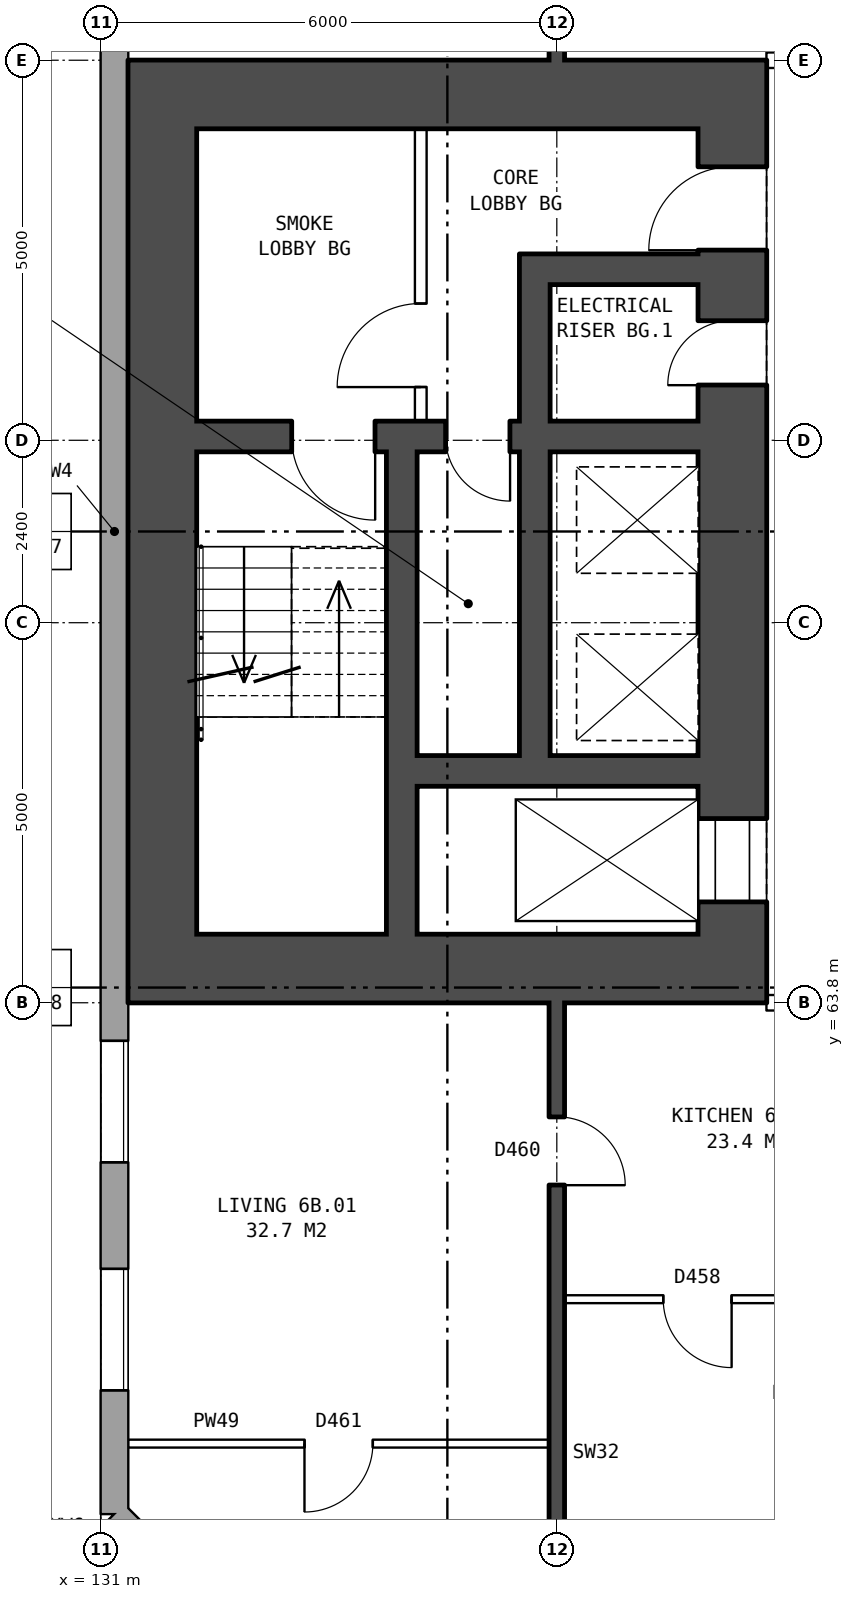
"""IFC4 building model, lengths in metres.
Left out: names, types, materials, properties, quantities, classifications, styles, units other than length and angle.
Written with IfcOpenShell. Run it as: python <this file> out.ifc"""

import sys

from ifc_helpers import new_model, si_unit, direction, frame, frame_2d, origin, place, context, subcontext, project, spatial, rectangle, extrude, element, fill, save


model = new_model("IFC4")
c1 = context("Model", 3, precision=1e-05, world=origin(), true_north=direction((0.0, 1.0)))
c2 = subcontext(c1, "Body", "Model", "MODEL_VIEW")
j1 = project(units=[si_unit("LENGTHUNIT", "METRE"), si_unit("PLANEANGLEUNIT", "RADIAN")], contexts=[c1])
p1 = place(None, origin())
s1 = spatial("IfcSite", under=j1, at=p1, CompositionType="ELEMENT")
p2 = place(p1, origin())
s2 = spatial("IfcBuilding", under=s1, at=p2, CompositionType="ELEMENT")
p3 = place(p2, frame((0.0, 0.0, 25.7)))
s3 = spatial("IfcBuildingStorey", under=s2, at=p3, CompositionType="ELEMENT", Elevation=25.7)
p4 = place(p3, frame((131.18, 57.075, 0.0), z_axis=(0.0, 0.0, 1.0), x_axis=(0.707106781187, -0.707106781187, 0.0)))
e1 = element("IfcWall", 1, at=p4, inside=s3, PredefinedType="STANDARD", context=c2, shape_type="SweptSolid", body=[
    extrude(rectangle(XDim=4.094, YDim=0.36, at=frame_2d((2.047, 0.0))), origin(), (0.0, 0.0, 1.0), 2.85),
])
p5 = place(p4, frame((1.247, 0.0, 0.8)))
e2 = element("IfcOpeningElement", 2, at=p5, cuts=e1, PredefinedType="OPENING", context=c2, shape_type="SweptSolid", body=[
    extrude(rectangle(XDim=1.6, YDim=1.8, at=frame_2d((0.8, 0.9))), frame((0.0, 0.19, 0.0), z_axis=(0.0, -1.0, 0.0), x_axis=(1.0, 0.0, 0.0)), (0.0, 0.0, 1.0), 0.38),
])
p6 = place(p3, frame((131.18, 82.925, 0.0), z_axis=(0.0, 0.0, 1.0), x_axis=(0.0, -1.0, 0.0)))
e3 = element("IfcWall", 3, at=p6, inside=s3, PredefinedType="STANDARD", context=c2, shape_type="SweptSolid", body=[
    extrude(rectangle(XDim=25.851, YDim=0.36, at=frame_2d((12.925, 0.0))), origin(), (0.0, 0.0, 1.0), 2.85),
])
p7 = place(p6, frame((1.625, 0.0, 0.8)))
e4 = element("IfcOpeningElement", 4, at=p7, cuts=e3, PredefinedType="OPENING", context=c2, shape_type="SweptSolid", body=[
    extrude(rectangle(XDim=1.6, YDim=1.8, at=frame_2d((0.8, 0.9))), frame((0.0, 0.19, 0.0), z_axis=(0.0, -1.0, 0.0), x_axis=(1.0, 0.0, 0.0)), (0.0, 0.0, 1.0), 0.38),
])
p8 = place(p6, frame((4.625, 0.0, 0.8)))
e5 = element("IfcOpeningElement", 5, at=p8, cuts=e3, PredefinedType="OPENING", context=c2, shape_type="SweptSolid", body=[
    extrude(rectangle(XDim=1.6, YDim=1.8, at=frame_2d((0.8, 0.9))), frame((0.0, 0.19, 0.0), z_axis=(0.0, -1.0, 0.0), x_axis=(1.0, 0.0, 0.0)), (0.0, 0.0, 1.0), 0.38),
])
p9 = place(p6, frame((19.625, 0.0, 0.8)))
e6 = element("IfcOpeningElement", 6, at=p9, cuts=e3, PredefinedType="OPENING", context=c2, shape_type="SweptSolid", body=[
    extrude(rectangle(XDim=1.6, YDim=1.8, at=frame_2d((0.8, 0.9))), frame((0.0, 0.19, 0.0), z_axis=(0.0, -1.0, 0.0), x_axis=(1.0, 0.0, 0.0)), (0.0, 0.0, 1.0), 0.38),
])
p10 = place(p6, frame((22.625, 0.0, 0.8)))
e7 = element("IfcOpeningElement", 7, at=p10, cuts=e3, PredefinedType="OPENING", context=c2, shape_type="SweptSolid", body=[
    extrude(rectangle(XDim=1.6, YDim=1.8, at=frame_2d((0.8, 0.9))), frame((0.0, 0.19, 0.0), z_axis=(0.0, -1.0, 0.0), x_axis=(1.0, 0.0, 0.0)), (0.0, 0.0, 1.0), 0.38),
])
p11 = place(p3, frame((139.31, 64.7, 0.0), z_axis=(0.0, 0.0, 1.0), x_axis=(0.0, 1.0, 0.0)))
e8 = element("IfcWall", 8, at=p11, inside=s3, PredefinedType="SHEAR", context=c2, shape_type="SweptSolid", body=[
    extrude(rectangle(XDim=10.6, YDim=0.9, at=frame_2d((5.3, 0.0))), origin(), (0.0, 0.0, 1.0), 2.85),
])
p12 = place(p11, frame((0.425, 0.0, 0.0)))
e9 = element("IfcOpeningElement", 9, at=p12, cuts=e8, PredefinedType="OPENING", context=c2, shape_type="SweptSolid", body=[
    extrude(rectangle(XDim=1.1, YDim=2.1, at=frame_2d((0.55, 1.05))), frame((0.0, 0.46, 0.0), z_axis=(0.0, -1.0, 0.0), x_axis=(1.0, 0.0, 0.0)), (0.0, 0.0, 1.0), 0.92),
])
p13 = place(p11, frame((9.0, 0.0, 0.0)))
e10 = element("IfcOpeningElement", 10, at=p13, cuts=e8, PredefinedType="OPENING", context=c2, shape_type="SweptSolid", body=[
    extrude(rectangle(XDim=1.1, YDim=2.1, at=frame_2d((0.55, 1.05))), frame((0.0, 0.46, 0.0), z_axis=(0.0, -1.0, 0.0), x_axis=(1.0, 0.0, 0.0)), (0.0, 0.0, 1.0), 0.92),
])
p14 = place(p11, frame((7.225, 0.0, 0.0)))
e11 = element("IfcOpeningElement", 11, at=p14, cuts=e8, PredefinedType="OPENING", context=c2, shape_type="SweptSolid", body=[
    extrude(rectangle(XDim=0.85, YDim=2.1, at=frame_2d((0.425, 1.05))), frame((0.0, 0.46, 0.0), z_axis=(0.0, -1.0, 0.0), x_axis=(1.0, 0.0, 0.0)), (0.0, 0.0, 1.0), 0.92),
])
p15 = place(p3, frame((131.81, 64.7, 0.0), z_axis=(0.0, 0.0, 1.0), x_axis=(0.0, 1.0, 0.0)))
e12 = element("IfcWall", 12, at=p15, inside=s3, PredefinedType="SHEAR", context=c2, shape_type="SweptSolid", body=[
    extrude(rectangle(XDim=10.6, YDim=0.9, at=frame_2d((5.3, 0.0))), origin(), (0.0, 0.0, 1.0), 2.85),
])
for number, where, z_axis, x_axis in (
    (13, (139.76, 64.25, 0.0), (0.0, 0.0, 1.0), (-1.0, 0.0, 0.0)),
    (14, (139.76, 75.75, 0.0), (0.0, 0.0, 1.0), (-1.0, 0.0, 0.0)),
):
    element("IfcWall", number, at=place(p3, frame(where, z_axis=z_axis, x_axis=x_axis)), inside=s3, PredefinedType="SHEAR", context=c2, shape_type="SweptSolid", body=[
        extrude(rectangle(XDim=8.4, YDim=0.9, at=frame_2d((4.2, 0.0))), origin(), (0.0, 0.0, 1.0), 2.85),
    ])
p16 = place(p3, frame((138.86, 66.85, 0.0), z_axis=(0.0, 0.0, 1.0), x_axis=(-1.0, 0.0, 0.0)))
e15 = element("IfcWall", 15, at=p16, inside=s3, PredefinedType="SHEAR", context=c2, shape_type="SweptSolid", body=[
    extrude(rectangle(XDim=3.7, YDim=0.4, at=frame_2d((1.85, 0.0))), origin(), (0.0, 0.0, 1.0), 2.85),
])
p17 = place(p3, frame((138.86, 71.25, 0.0), z_axis=(0.0, 0.0, 1.0), x_axis=(-1.0, 0.0, 0.0)))
e16 = element("IfcWall", 16, at=p17, inside=s3, PredefinedType="SHEAR", context=c2, shape_type="SweptSolid", body=[
    extrude(rectangle(XDim=6.6, YDim=0.4, at=frame_2d((3.3, 0.0))), origin(), (0.0, 0.0, 1.0), 2.85),
])
p18 = place(p17, frame((4.25, 0.0, 0.0)))
e17 = element("IfcOpeningElement", 17, at=p18, cuts=e16, PredefinedType="OPENING", context=c2, shape_type="SweptSolid", body=[
    extrude(rectangle(XDim=1.1, YDim=2.1, at=frame_2d((0.55, 1.05))), frame((0.0, 0.21, 0.0), z_axis=(0.0, -1.0, 0.0), x_axis=(1.0, 0.0, 0.0)), (0.0, 0.0, 1.0), 0.42),
])
p19 = place(p17, frame((2.475, 0.0, 0.0)))
e18 = element("IfcOpeningElement", 18, at=p19, cuts=e16, PredefinedType="OPENING", context=c2, shape_type="SweptSolid", body=[
    extrude(rectangle(XDim=0.85, YDim=2.1, at=frame_2d((0.425, 1.05))), frame((0.0, 0.21, 0.0), z_axis=(0.0, -1.0, 0.0), x_axis=(1.0, 0.0, 0.0)), (0.0, 0.0, 1.0), 0.42),
])
p20 = place(p3, frame((138.86, 73.45, 0.0), z_axis=(0.0, 0.0, 1.0), x_axis=(-1.0, 0.0, 0.0)))
e19 = element("IfcWall", 19, at=p20, inside=s3, PredefinedType="SHEAR", context=c2, shape_type="SweptSolid", body=[
    extrude(rectangle(XDim=1.95, YDim=0.4, at=frame_2d((0.975, 0.0))), origin(), (0.0, 0.0, 1.0), 2.85),
])
p21 = place(p3, frame((136.71, 67.05, 0.0), z_axis=(0.0, 0.0, 1.0), x_axis=(0.0, 1.0, 0.0)))
e20 = element("IfcWall", 20, at=p21, inside=s3, PredefinedType="SHEAR", context=c2, shape_type="SweptSolid", body=[
    extrude(rectangle(XDim=4.0, YDim=0.4, at=frame_2d((2.0, 0.0))), origin(), (0.0, 0.0, 1.0), 2.85),
])
p22 = place(p3, frame((136.71, 71.45, 0.0), z_axis=(0.0, 0.0, 1.0), x_axis=(0.0, 1.0, 0.0)))
e21 = element("IfcWall", 21, at=p22, inside=s3, PredefinedType="SHEAR", context=c2, shape_type="SweptSolid", body=[
    extrude(rectangle(XDim=2.2, YDim=0.4, at=frame_2d((1.1, 0.0))), origin(), (0.0, 0.0, 1.0), 2.85),
])
p23 = place(p3, frame((135.21, 71.45, 0.0), z_axis=(0.0, 0.0, 1.0), x_axis=(0.0, 1.0, 0.0)))
e22 = element("IfcWall", 22, at=p23, inside=s3, PredefinedType="PARTITIONING", context=c2, shape_type="SweptSolid", body=[
    extrude(rectangle(XDim=3.85, YDim=0.15, at=frame_2d((1.925, 0.0))), origin(), (0.0, 0.0, 1.0), 2.85),
])
p24 = place(p23, frame((0.45, 0.0, 0.0)))
e23 = element("IfcOpeningElement", 23, at=p24, cuts=e22, PredefinedType="OPENING", context=c2, shape_type="SweptSolid", body=[
    extrude(rectangle(XDim=1.1, YDim=2.1, at=frame_2d((0.55, 1.05))), frame((0.0, 0.085, 0.0), z_axis=(0.0, -1.0, 0.0), x_axis=(1.0, 0.0, 0.0)), (0.0, 0.0, 1.0), 0.17),
])
p25 = place(p3, frame((134.96, 64.7, 0.0), z_axis=(0.0, 0.0, 1.0), x_axis=(0.0, 1.0, 0.0)))
e24 = element("IfcWall", 24, at=p25, inside=s3, PredefinedType="SHEAR", context=c2, shape_type="SweptSolid", body=[
    extrude(rectangle(XDim=6.35, YDim=0.4, at=frame_2d((3.175, 0.0))), origin(), (0.0, 0.0, 1.0), 2.85),
])
p26 = place(p3, frame((131.36, 58.0, 0.0), z_axis=(0.0, 0.0, 1.0), x_axis=(1.0, 0.0, 0.0)))
e25 = element("IfcWall", 25, at=p26, inside=s3, PredefinedType="PARTITIONING", context=c2, shape_type="SweptSolid", body=[
    extrude(rectangle(XDim=5.54, YDim=0.1, at=frame_2d((2.77, 0.0))), origin(), (0.0, 0.0, 1.0), 2.85),
])
p27 = place(p26, frame((2.32, 0.0, 0.0)))
e26 = element("IfcOpeningElement", 26, at=p27, cuts=e25, PredefinedType="OPENING", context=c2, shape_type="SweptSolid", body=[
    extrude(rectangle(XDim=0.9, YDim=2.1, at=frame_2d((0.45, 1.05))), frame((0.0, 0.06, 0.0), z_axis=(0.0, -1.0, 0.0), x_axis=(1.0, 0.0, 0.0)), (0.0, 0.0, 1.0), 0.12),
])
p28 = place(p3, frame((137.1, 59.9, 0.0), z_axis=(0.0, 0.0, 1.0), x_axis=(1.0, 0.0, 0.0)))
e27 = element("IfcWall", 27, at=p28, inside=s3, PredefinedType="PARTITIONING", context=c2, shape_type="SweptSolid", body=[
    extrude(rectangle(XDim=5.8, YDim=0.1, at=frame_2d((2.9, 0.0))), origin(), (0.0, 0.0, 1.0), 2.85),
])
p29 = place(p28, frame((1.3, 0.0, 0.0)))
e28 = element("IfcOpeningElement", 28, at=p29, cuts=e27, PredefinedType="OPENING", context=c2, shape_type="SweptSolid", body=[
    extrude(rectangle(XDim=0.9, YDim=2.1, at=frame_2d((0.45, 1.05))), frame((0.0, 0.06, 0.0), z_axis=(0.0, -1.0, 0.0), x_axis=(1.0, 0.0, 0.0)), (0.0, 0.0, 1.0), 0.12),
])
p30 = place(p28, frame((4.2, 0.0, 0.0)))
e29 = element("IfcOpeningElement", 29, at=p30, cuts=e27, PredefinedType="OPENING", context=c2, shape_type="SweptSolid", body=[
    extrude(rectangle(XDim=0.9, YDim=2.1, at=frame_2d((0.45, 1.05))), frame((0.0, 0.06, 0.0), z_axis=(0.0, -1.0, 0.0), x_axis=(1.0, 0.0, 0.0)), (0.0, 0.0, 1.0), 0.12),
])
p31 = place(p3, frame((139.76, 63.8, 0.0), z_axis=(0.0, 0.0, 1.0), x_axis=(1.0, 0.0, 0.0)))
e30 = element("IfcWall", 30, at=p31, inside=s3, PredefinedType="PARTITIONING", context=c2, shape_type="SweptSolid", body=[
    extrude(rectangle(XDim=3.0, YDim=0.2, at=frame_2d((1.5, 0.0))), origin(), (0.0, 0.0, 1.0), 2.85),
])
p32 = place(p31, frame((1.0, 0.0, 0.0)))
e31 = element("IfcOpeningElement", 31, at=p32, cuts=e30, PredefinedType="OPENING", context=c2, shape_type="SweptSolid", body=[
    extrude(rectangle(XDim=1.0, YDim=2.1, at=frame_2d((0.5, 1.05))), frame((0.0, 0.11, 0.0), z_axis=(0.0, -1.0, 0.0), x_axis=(1.0, 0.0, 0.0)), (0.0, 0.0, 1.0), 0.22),
])
p33 = place(p3, frame((139.76, 76.2, 0.0), z_axis=(0.0, 0.0, 1.0), x_axis=(1.0, 0.0, 0.0)))
e32 = element("IfcWall", 32, at=p33, inside=s3, PredefinedType="PARTITIONING", context=c2, shape_type="SweptSolid", body=[
    extrude(rectangle(XDim=3.0, YDim=0.2, at=frame_2d((1.5, 0.0))), origin(), (0.0, 0.0, 1.0), 2.85),
])
p34 = place(p33, frame((1.0, 0.0, 0.0)))
e33 = element("IfcOpeningElement", 33, at=p34, cuts=e32, PredefinedType="OPENING", context=c2, shape_type="SweptSolid", body=[
    extrude(rectangle(XDim=1.0, YDim=2.1, at=frame_2d((0.5, 1.05))), frame((0.0, 0.11, 0.0), z_axis=(0.0, -1.0, 0.0), x_axis=(1.0, 0.0, 0.0)), (0.0, 0.0, 1.0), 0.22),
])
p35 = place(p3, frame((137.0, 54.36, 0.0), z_axis=(0.0, 0.0, 1.0), x_axis=(0.0, 1.0, 0.0)))
e34 = element("IfcWall", 34, at=p35, inside=s3, PredefinedType="SOLIDWALL", context=c2, shape_type="SweptSolid", body=[
    extrude(rectangle(XDim=9.44, YDim=0.2, at=frame_2d((4.72, 0.0))), origin(), (0.0, 0.0, 1.0), 2.85),
])
p36 = place(p35, frame((7.04, 0.0, 0.0)))
e35 = element("IfcOpeningElement", 35, at=p36, cuts=e34, PredefinedType="OPENING", context=c2, shape_type="SweptSolid", body=[
    extrude(rectangle(XDim=0.9, YDim=2.1, at=frame_2d((0.45, 1.05))), frame((0.0, 0.11, 0.0), z_axis=(0.0, -1.0, 0.0), x_axis=(1.0, 0.0, 0.0)), (0.0, 0.0, 1.0), 0.22),
])
p37 = place(p3, frame((137.0, 76.2, 0.0), z_axis=(0.0, 0.0, 1.0), x_axis=(0.0, 1.0, 0.0)))
e36 = element("IfcWall", 36, at=p37, inside=s3, PredefinedType="SOLIDWALL", context=c2, shape_type="SweptSolid", body=[
    extrude(rectangle(XDim=9.44, YDim=0.2, at=frame_2d((4.72, 0.0))), origin(), (0.0, 0.0, 1.0), 2.85),
])
p38 = place(p37, frame((1.5, 0.0, 0.0)))
e37 = element("IfcOpeningElement", 37, at=p38, cuts=e36, PredefinedType="OPENING", context=c2, shape_type="SweptSolid", body=[
    extrude(rectangle(XDim=0.9, YDim=2.1, at=frame_2d((0.45, 1.05))), frame((0.0, 0.11, 0.0), z_axis=(0.0, -1.0, 0.0), x_axis=(1.0, 0.0, 0.0)), (0.0, 0.0, 1.0), 0.22),
])
p39 = place(p9, origin())
e38 = element("IfcWindow", 38, at=p39, inside=s3, PartitioningType="SINGLE_PANEL", PredefinedType="WINDOW", context=c2, shape_type="SweptSolid", body=[
    extrude(rectangle(XDim=1.6, YDim=1.8, at=frame_2d((0.8, 0.9))), frame((0.0, 0.15, 0.0), z_axis=(0.0, -1.0, 0.0), x_axis=(1.0, 0.0, 0.0)), (0.0, 0.0, 1.0), 0.06),
])
fill(e6, e38)
p40 = place(p10, origin())
e39 = element("IfcWindow", 39, at=p40, inside=s3, PartitioningType="SINGLE_PANEL", PredefinedType="WINDOW", context=c2, shape_type="SweptSolid", body=[
    extrude(rectangle(XDim=1.6, YDim=1.8, at=frame_2d((0.8, 0.9))), frame((0.0, 0.15, 0.0), z_axis=(0.0, -1.0, 0.0), x_axis=(1.0, 0.0, 0.0)), (0.0, 0.0, 1.0), 0.06),
])
fill(e7, e39)
p41 = place(p12, origin())
e40 = element("IfcDoor", 40, at=p41, inside=s3, OperationType="DOUBLE_DOOR_SLIDING", PredefinedType="DOOR", context=c2, shape_type="SweptSolid", body=[
    extrude(rectangle(XDim=1.1, YDim=2.1, at=frame_2d((0.55, 1.05))), frame((0.0, 0.435, 0.0), z_axis=(0.0, -1.0, 0.0), x_axis=(1.0, 0.0, 0.0)), (0.0, 0.0, 1.0), 0.05),
])
fill(e9, e40)
p42 = place(p13, origin())
e41 = element("IfcDoor", 41, at=p42, inside=s3, OperationType="SINGLE_SWING_LEFT", PredefinedType="DOOR", context=c2, shape_type="SweptSolid", body=[
    extrude(rectangle(XDim=1.1, YDim=2.1, at=frame_2d((0.55, 1.05))), frame((0.0, 0.435, 0.0), z_axis=(0.0, -1.0, 0.0), x_axis=(1.0, 0.0, 0.0)), (0.0, 0.0, 1.0), 0.05),
])
fill(e10, e41)
p43 = place(p24, origin())
e42 = element("IfcDoor", 42, at=p43, inside=s3, OperationType="SINGLE_SWING_LEFT", PredefinedType="DOOR", context=c2, shape_type="SweptSolid", body=[
    extrude(rectangle(XDim=1.1, YDim=2.1, at=frame_2d((0.55, 1.05))), frame((0.0, 0.025, 0.0), z_axis=(0.0, -1.0, 0.0), x_axis=(1.0, 0.0, 0.0)), (0.0, 0.0, 1.0), 0.05),
])
fill(e23, e42)
p44 = place(p18, origin())
e43 = element("IfcDoor", 43, at=p44, inside=s3, OperationType="SINGLE_SWING_LEFT", PredefinedType="DOOR", context=c2, shape_type="SweptSolid", body=[
    extrude(rectangle(XDim=1.1, YDim=2.1, at=frame_2d((0.55, 1.05))), frame((0.0, 0.025, 0.0), z_axis=(0.0, -1.0, 0.0), x_axis=(1.0, 0.0, 0.0)), (0.0, 0.0, 1.0), 0.05),
])
fill(e17, e43)
p45 = place(p14, origin())
e44 = element("IfcDoor", 44, at=p45, inside=s3, OperationType="SINGLE_SWING_LEFT", PredefinedType="DOOR", context=c2, shape_type="SweptSolid", body=[
    extrude(rectangle(XDim=0.85, YDim=2.1, at=frame_2d((0.425, 1.05))), frame((0.0, 0.435, 0.0), z_axis=(0.0, -1.0, 0.0), x_axis=(1.0, 0.0, 0.0)), (0.0, 0.0, 1.0), 0.05),
])
fill(e11, e44)
p46 = place(p19, origin())
e45 = element("IfcDoor", 45, at=p46, inside=s3, OperationType="SINGLE_SWING_LEFT", PredefinedType="DOOR", context=c2, shape_type="SweptSolid", body=[
    extrude(rectangle(XDim=0.85, YDim=2.1, at=frame_2d((0.425, 1.05))), frame((0.0, 0.025, 0.0), z_axis=(0.0, -1.0, 0.0), x_axis=(1.0, 0.0, 0.0)), (0.0, 0.0, 1.0), 0.05),
])
fill(e18, e45)
p47 = place(p29, frame((0.9, 0.0, 0.0), z_axis=(0.0, 0.0, 1.0), x_axis=(-1.0, 0.0, 0.0)))
e46 = element("IfcDoor", 46, at=p47, inside=s3, OperationType="SINGLE_SWING_LEFT", PredefinedType="DOOR", context=c2, shape_type="SweptSolid", body=[
    extrude(rectangle(XDim=0.9, YDim=2.1, at=frame_2d((0.45, 1.05))), frame((0.0, 0.025, 0.0), z_axis=(0.0, -1.0, 0.0), x_axis=(1.0, 0.0, 0.0)), (0.0, 0.0, 1.0), 0.05),
])
fill(e28, e46)
p48 = place(p27, frame((0.9, 0.0, 0.0), z_axis=(0.0, 0.0, 1.0), x_axis=(-1.0, 0.0, 0.0)))
e47 = element("IfcDoor", 47, at=p48, inside=s3, OperationType="SINGLE_SWING_RIGHT", PredefinedType="DOOR", context=c2, shape_type="SweptSolid", body=[
    extrude(rectangle(XDim=0.9, YDim=2.1, at=frame_2d((0.45, 1.05))), frame((0.0, 0.025, 0.0), z_axis=(0.0, -1.0, 0.0), x_axis=(1.0, 0.0, 0.0)), (0.0, 0.0, 1.0), 0.05),
])
fill(e26, e47)
p49 = place(p36, frame((0.9, 0.0, 0.0), z_axis=(0.0, 0.0, 1.0), x_axis=(-1.0, 0.0, 0.0)))
e48 = element("IfcDoor", 48, at=p49, inside=s3, OperationType="SINGLE_SWING_RIGHT", PredefinedType="DOOR", context=c2, shape_type="SweptSolid", body=[
    extrude(rectangle(XDim=0.9, YDim=2.1, at=frame_2d((0.45, 1.05))), frame((0.0, 0.025, 0.0), z_axis=(0.0, -1.0, 0.0), x_axis=(1.0, 0.0, 0.0)), (0.0, 0.0, 1.0), 0.05),
])
fill(e35, e48)
save(model, sys.argv[1])
